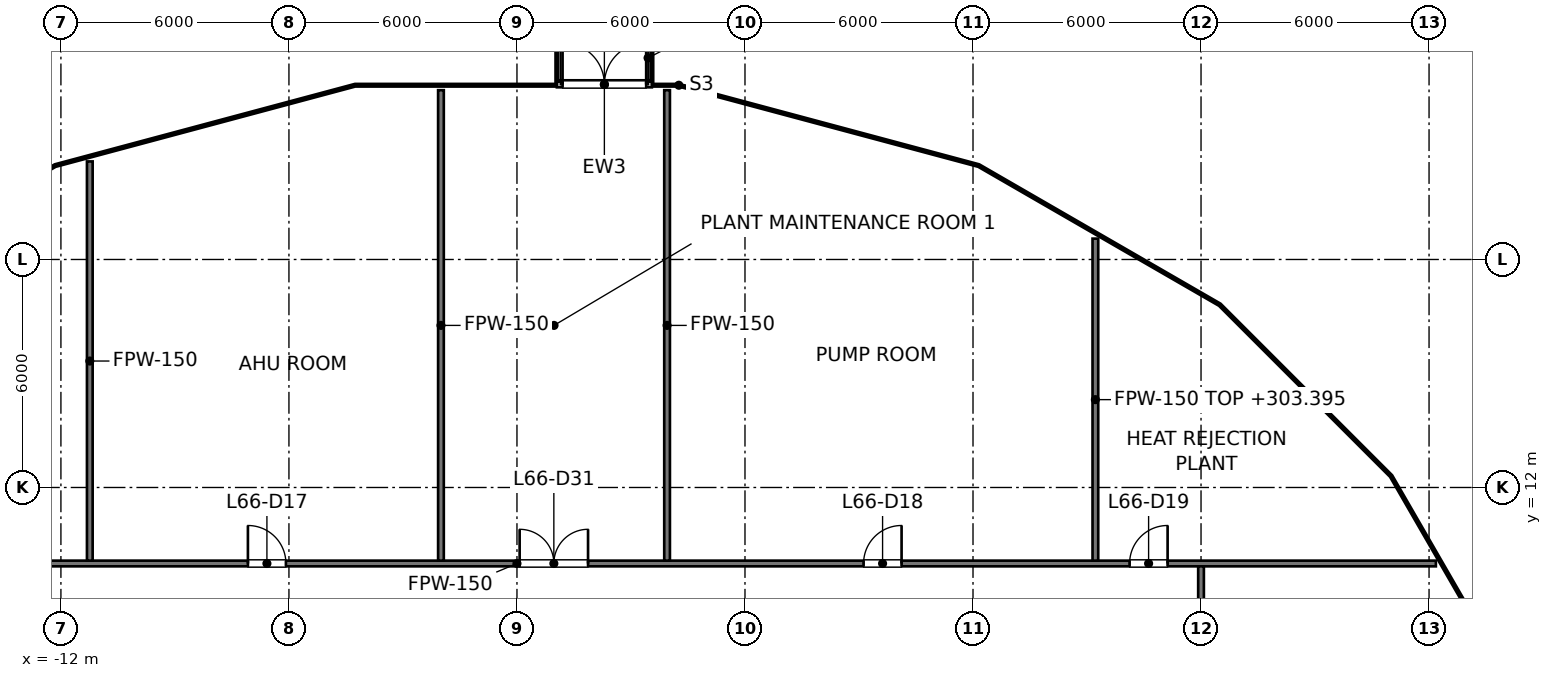
"""IFC4 building model, lengths in metres.
Left out: names, types, materials, properties, quantities, classifications, styles, units other than length and angle.
Written with IfcOpenShell. Run it as: python <this file> out.ifc"""

import sys

from ifc_helpers import new_model, si_unit, direction, frame, frame_2d, origin, place, context, subcontext, project, spatial, rectangle, extrude, element, fill, save


model = new_model("IFC4")
c1 = context("Model", 3, precision=1e-05, world=origin(), true_north=direction((0.0, 1.0)))
c2 = subcontext(c1, "Body", "Model", "MODEL_VIEW")
j1 = project(units=[si_unit("LENGTHUNIT", "METRE"), si_unit("PLANEANGLEUNIT", "RADIAN")], contexts=[c1])
p1 = place(None, origin())
s1 = spatial("IfcSite", under=j1, at=p1, CompositionType="ELEMENT")
p2 = place(p1, origin())
s2 = spatial("IfcBuilding", under=s1, at=p2, CompositionType="ELEMENT")
p3 = place(p2, frame((0.0, 0.0, 299.0)))
s3 = spatial("IfcBuildingStorey", under=s2, at=p3, CompositionType="ELEMENT", Elevation=299.0)
p4 = place(p3, frame((1.05, 22.605, 0.0), z_axis=(0.0, 0.0, 1.0), x_axis=(1.0, 0.0, 0.0)))
e1 = element("IfcWall", 1, at=p4, inside=s3, PredefinedType="SOLIDWALL", context=c2, shape_type="SweptSolid", body=[
    extrude(rectangle(XDim=2.5, YDim=0.15, at=frame_2d((1.25, 0.0))), origin(), (0.0, 0.0, 1.0), 2.5),
])
p5 = place(p4, frame((0.15, 0.0, 0.0)))
e2 = element("IfcOpeningElement", 2, at=p5, cuts=e1, PredefinedType="OPENING", context=c2, shape_type="SweptSolid", body=[
    extrude(rectangle(XDim=2.2, YDim=2.1, at=frame_2d((1.1, 1.05))), frame((0.0, 0.075, 0.0), z_axis=(0.0, -1.0, 0.0), x_axis=(1.0, 0.0, 0.0)), (0.0, 0.0, 1.0), 0.15),
])
p6 = place(p3, frame((-24.179, 10.0, 0.0), z_axis=(0.0, 0.0, 1.0), x_axis=(1.0, 0.0, 0.0)))
e3 = element("IfcWall", 3, at=p6, inside=s3, PredefinedType="PARTITIONING", context=c2, shape_type="SweptSolid", body=[
    extrude(rectangle(XDim=48.359, YDim=0.15, at=frame_2d((24.179, 0.0))), origin(), (0.0, 0.0, 1.0), 4.327),
])
p7 = place(p6, frame((9.05, 0.0, 0.0)))
e4 = element("IfcOpeningElement", 4, at=p7, cuts=e3, PredefinedType="OPENING", context=c2, shape_type="SweptSolid", body=[
    extrude(rectangle(XDim=1.0, YDim=2.1, at=frame_2d((0.5, 1.05))), frame((0.0, 0.075, 0.0), z_axis=(0.0, -1.0, 0.0), x_axis=(1.0, 0.0, 0.0)), (0.0, 0.0, 1.0), 0.15),
])
p8 = place(p6, frame((17.1, 0.0, 0.0)))
e5 = element("IfcOpeningElement", 5, at=p8, cuts=e3, PredefinedType="OPENING", context=c2, shape_type="SweptSolid", body=[
    extrude(rectangle(XDim=1.0, YDim=2.1, at=frame_2d((0.5, 1.05))), frame((0.0, 0.075, 0.0), z_axis=(0.0, -1.0, 0.0), x_axis=(1.0, 0.0, 0.0)), (0.0, 0.0, 1.0), 0.15),
])
p9 = place(p6, frame((33.3, 0.0, 0.0)))
e6 = element("IfcOpeningElement", 6, at=p9, cuts=e3, PredefinedType="OPENING", context=c2, shape_type="SweptSolid", body=[
    extrude(rectangle(XDim=1.0, YDim=2.1, at=frame_2d((0.5, 1.05))), frame((0.0, 0.075, 0.0), z_axis=(0.0, -1.0, 0.0), x_axis=(1.0, 0.0, 0.0)), (0.0, 0.0, 1.0), 0.15),
])
p10 = place(p6, frame((40.3, 0.0, 0.0)))
e7 = element("IfcOpeningElement", 7, at=p10, cuts=e3, PredefinedType="OPENING", context=c2, shape_type="SweptSolid", body=[
    extrude(rectangle(XDim=1.0, YDim=2.1, at=frame_2d((0.5, 1.05))), frame((0.0, 0.075, 0.0), z_axis=(0.0, -1.0, 0.0), x_axis=(1.0, 0.0, 0.0)), (0.0, 0.0, 1.0), 0.15),
])
p11 = place(p6, frame((24.25, 0.0, 0.0)))
e8 = element("IfcOpeningElement", 8, at=p11, cuts=e3, PredefinedType="OPENING", context=c2, shape_type="SweptSolid", body=[
    extrude(rectangle(XDim=1.8, YDim=2.1, at=frame_2d((0.9, 1.05))), frame((0.0, 0.075, 0.0), z_axis=(0.0, -1.0, 0.0), x_axis=(1.0, 0.0, 0.0)), (0.0, 0.0, 1.0), 0.15),
])
p12 = place(p3, frame((18.0, -9.925, 0.0), z_axis=(0.0, 0.0, 1.0), x_axis=(0.0, 1.0, 0.0)))
e9 = element("IfcWall", 9, at=p12, inside=s3, PredefinedType="PARTITIONING", context=c2, shape_type="SweptSolid", body=[
    extrude(rectangle(XDim=19.85, YDim=0.15, at=frame_2d((9.925, 0.0))), origin(), (0.0, 0.0, 1.0), 4.277),
])
p13 = place(p12, frame((5.7, 0.0, 0.0)))
e10 = element("IfcOpeningElement", 10, at=p13, cuts=e9, PredefinedType="OPENING", context=c2, shape_type="SweptSolid", body=[
    extrude(rectangle(XDim=1.0, YDim=2.1, at=frame_2d((0.5, 1.05))), frame((0.0, 0.075, 0.0), z_axis=(0.0, -1.0, 0.0), x_axis=(1.0, 0.0, 0.0)), (0.0, 0.0, 1.0), 0.15),
])
p14 = place(p12, frame((15.675, 0.0, 0.0)))
e11 = element("IfcOpeningElement", 11, at=p14, cuts=e9, PredefinedType="OPENING", context=c2, shape_type="SweptSolid", body=[
    extrude(rectangle(XDim=1.0, YDim=2.1, at=frame_2d((0.5, 1.05))), frame((0.0, 0.075, 0.0), z_axis=(0.0, -1.0, 0.0), x_axis=(1.0, 0.0, 0.0)), (0.0, 0.0, 1.0), 0.15),
])
for number, where, z_axis, x_axis in (
    (12, (-2.0, 10.075, 0.0), (0.0, 0.0, 1.0), (0.0, 1.0, 0.0)),
    (13, (3.95, 10.075, 0.0), (0.0, 0.0, 1.0), (0.0, 1.0, 0.0)),
):
    element("IfcWall", number, at=place(p3, frame(where, z_axis=z_axis, x_axis=x_axis)), inside=s3, PredefinedType="PARTITIONING", context=c2, shape_type="SweptSolid", body=[
        extrude(rectangle(XDim=12.38, YDim=0.15, at=frame_2d((6.19, 0.0))), origin(), (0.0, 0.0, 1.0), 4.327),
    ])
p15 = place(p3, frame((-11.24, 10.075, 0.0), z_axis=(0.0, 0.0, 1.0), x_axis=(0.0, 1.0, 0.0)))
e14 = element("IfcWall", 14, at=p15, inside=s3, PredefinedType="PARTITIONING", context=c2, shape_type="SweptSolid", body=[
    extrude(rectangle(XDim=10.505, YDim=0.15, at=frame_2d((5.252, 0.0))), origin(), (0.0, 0.0, 1.0), 4.327),
])
p16 = place(p3, frame((15.22, 10.075, 0.0), z_axis=(0.0, 0.0, 1.0), x_axis=(0.0, 1.0, 0.0)))
e15 = element("IfcWall", 15, at=p16, inside=s3, PredefinedType="PARTITIONING", context=c2, shape_type="SweptSolid", body=[
    extrude(rectangle(XDim=8.474, YDim=0.15, at=frame_2d((4.237, 0.0))), origin(), (0.0, 0.0, 1.0), 4.395),
])
p17 = place(p5, origin())
e16 = element("IfcDoor", 16, at=p17, inside=s3, OperationType="DOUBLE_DOOR_SINGLE_SWING", PredefinedType="DOOR", context=c2, shape_type="SweptSolid", body=[
    extrude(rectangle(XDim=2.2, YDim=2.1, at=frame_2d((1.1, 1.05))), frame((0.0, 0.025, 0.0), z_axis=(0.0, -1.0, 0.0), x_axis=(1.0, 0.0, 0.0)), (0.0, 0.0, 1.0), 0.05),
])
fill(e2, e16)
p18 = place(p8, origin())
e17 = element("IfcDoor", 17, at=p18, inside=s3, OperationType="SINGLE_SWING_LEFT", PredefinedType="DOOR", context=c2, shape_type="SweptSolid", body=[
    extrude(rectangle(XDim=1.0, YDim=2.1, at=frame_2d((0.5, 1.05))), frame((0.0, 0.025, 0.0), z_axis=(0.0, -1.0, 0.0), x_axis=(1.0, 0.0, 0.0)), (0.0, 0.0, 1.0), 0.05),
])
fill(e5, e17)
p19 = place(p9, origin())
e18 = element("IfcDoor", 18, at=p19, inside=s3, OperationType="SINGLE_SWING_RIGHT", PredefinedType="DOOR", context=c2, shape_type="SweptSolid", body=[
    extrude(rectangle(XDim=1.0, YDim=2.1, at=frame_2d((0.5, 1.05))), frame((0.0, 0.025, 0.0), z_axis=(0.0, -1.0, 0.0), x_axis=(1.0, 0.0, 0.0)), (0.0, 0.0, 1.0), 0.05),
])
fill(e6, e18)
p20 = place(p10, origin())
e19 = element("IfcDoor", 19, at=p20, inside=s3, OperationType="SINGLE_SWING_RIGHT", PredefinedType="DOOR", context=c2, shape_type="SweptSolid", body=[
    extrude(rectangle(XDim=1.0, YDim=2.1, at=frame_2d((0.5, 1.05))), frame((0.0, 0.025, 0.0), z_axis=(0.0, -1.0, 0.0), x_axis=(1.0, 0.0, 0.0)), (0.0, 0.0, 1.0), 0.05),
])
fill(e7, e19)
p21 = place(p11, origin())
e20 = element("IfcDoor", 20, at=p21, inside=s3, OperationType="DOUBLE_DOOR_SINGLE_SWING", PredefinedType="DOOR", context=c2, shape_type="SweptSolid", body=[
    extrude(rectangle(XDim=1.8, YDim=2.1, at=frame_2d((0.9, 1.05))), frame((0.0, 0.025, 0.0), z_axis=(0.0, -1.0, 0.0), x_axis=(1.0, 0.0, 0.0)), (0.0, 0.0, 1.0), 0.05),
])
fill(e8, e20)
save(model, sys.argv[1])
